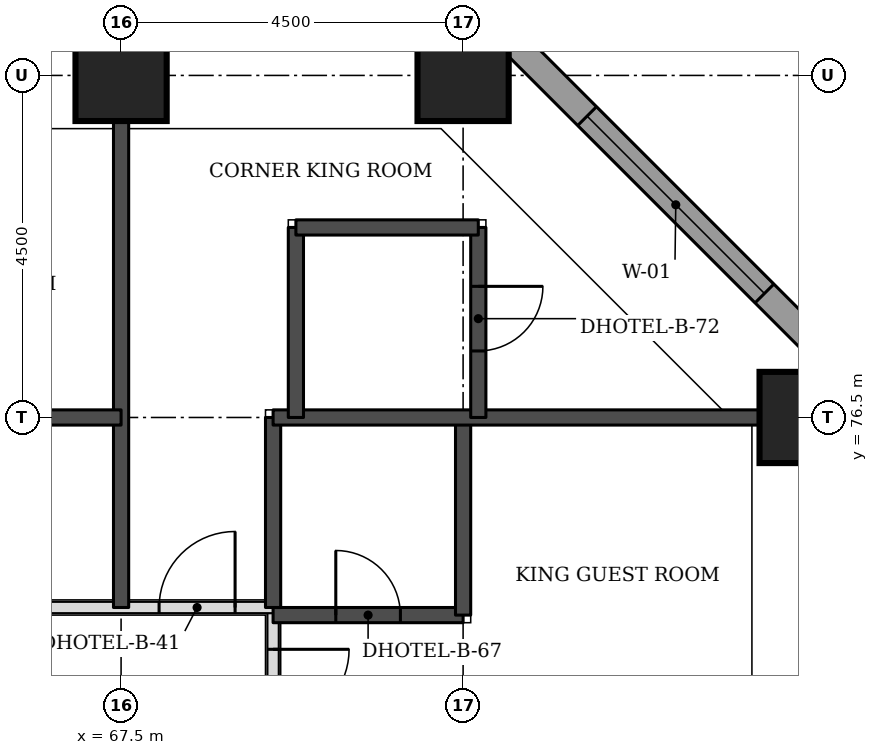
"""IFC4 building model, lengths in metres.
Left out: names, types, materials, properties, quantities, classifications, styles, units other than length and angle.
Written with IfcOpenShell. Run it as: python <this file> out.ifc"""

import sys

from ifc_helpers import new_model, si_unit, direction, frame, frame_2d, origin, origin_2d, place, context, subcontext, project, spatial, rectangle, extrude, element, fill, save


model = new_model("IFC4")
c1 = context("Model", 3, precision=1e-05, world=origin(), true_north=direction((0.0, 1.0)))
c2 = subcontext(c1, "Body", "Model", "MODEL_VIEW")
j1 = project(units=[si_unit("LENGTHUNIT", "METRE"), si_unit("PLANEANGLEUNIT", "RADIAN")], contexts=[c1])
p1 = place(None, origin())
s1 = spatial("IfcSite", under=j1, at=p1, CompositionType="ELEMENT")
p2 = place(p1, origin())
s2 = spatial("IfcBuilding", under=s1, at=p2, CompositionType="ELEMENT")
p3 = place(p2, frame((0.0, 0.0, 52.8)))
s3 = spatial("IfcBuildingStorey", under=s2, at=p3, CompositionType="ELEMENT", Elevation=52.8)
for number, where, z_axis, x_axis in (
    (1, (76.5, 76.5, 0.0), (0.0, 0.0, 1.0), (1.0, 0.0, 0.0)),
    (2, (67.5, 81.0, 0.0), (0.0, 0.0, 1.0), (1.0, 0.0, 0.0)),
    (3, (72.0, 81.0, 0.0), (0.0, 0.0, 1.0), (1.0, 0.0, 0.0)),
):
    element("IfcColumn", number, at=place(p3, frame(where, z_axis=z_axis, x_axis=x_axis)), inside=s3, PredefinedType="COLUMN", context=c2, shape_type="SweptSolid", body=[
        extrude(rectangle(XDim=1.2, YDim=1.2, at=origin_2d()), origin(), (0.0, 0.0, 1.0), 3.3),
    ])
p4 = place(p3, frame((77.326, 76.77, 0.0), z_axis=(0.0, 0.0, 1.0), x_axis=(-0.707106781187, 0.707106781187, 0.0)))
e4 = element("IfcWall", 4, at=p4, inside=s3, PredefinedType="STANDARD", context=c2, shape_type="SweptSolid", body=[
    extrude(rectangle(XDim=7.151, YDim=0.35, at=frame_2d((3.576, 0.0))), origin(), (0.0, 0.0, 1.0), 3.055),
])
p5 = place(p4, frame((1.926, 0.0, 0.8)))
e5 = element("IfcOpeningElement", 5, at=p5, cuts=e4, PredefinedType="OPENING", context=c2, shape_type="SweptSolid", body=[
    extrude(rectangle(XDim=3.3, YDim=1.5, at=frame_2d((1.65, 0.75))), frame((0.0, 0.185, 0.0), z_axis=(0.0, -1.0, 0.0), x_axis=(1.0, 0.0, 0.0)), (0.0, 0.0, 1.0), 0.37),
])
p6 = place(p3, frame((69.5, 47.5, 0.0), z_axis=(0.0, 0.0, 1.0), x_axis=(0.0, 1.0, 0.0)))
e6 = element("IfcWall", 6, at=p6, inside=s3, PredefinedType="PARTITIONING", context=c2, shape_type="SweptSolid", body=[
    extrude(rectangle(XDim=26.5, YDim=0.15, at=frame_2d((13.25, 0.0))), origin(), (0.0, 0.0, 1.0), 3.08),
])
p7 = place(p6, frame((24.95, 0.0, 0.0)))
e7 = element("IfcOpeningElement", 7, at=p7, cuts=e6, PredefinedType="OPENING", context=c2, shape_type="SweptSolid", body=[
    extrude(rectangle(XDim=1.0, YDim=2.1, at=frame_2d((0.5, 1.05))), frame((0.0, 0.085, 0.0), z_axis=(0.0, -1.0, 0.0), x_axis=(1.0, 0.0, 0.0)), (0.0, 0.0, 1.0), 0.17),
])
p8 = place(p6, frame((20.7, 0.0, 0.0)))
e8 = element("IfcOpeningElement", 8, at=p8, cuts=e6, PredefinedType="OPENING", context=c2, shape_type="SweptSolid", body=[
    extrude(rectangle(XDim=1.0, YDim=2.1, at=frame_2d((0.5, 1.05))), frame((0.0, 0.085, 0.0), z_axis=(0.0, -1.0, 0.0), x_axis=(1.0, 0.0, 0.0)), (0.0, 0.0, 1.0), 0.17),
])
p9 = place(p6, frame((18.55, 0.0, 0.0)))
e9 = element("IfcOpeningElement", 9, at=p9, cuts=e6, PredefinedType="OPENING", context=c2, shape_type="SweptSolid", body=[
    extrude(rectangle(XDim=1.0, YDim=2.1, at=frame_2d((0.5, 1.05))), frame((0.0, 0.085, 0.0), z_axis=(0.0, -1.0, 0.0), x_axis=(1.0, 0.0, 0.0)), (0.0, 0.0, 1.0), 0.17),
])
p10 = place(p6, frame((11.7, 0.0, 0.0)))
e10 = element("IfcOpeningElement", 10, at=p10, cuts=e6, PredefinedType="OPENING", context=c2, shape_type="SweptSolid", body=[
    extrude(rectangle(XDim=1.0, YDim=2.1, at=frame_2d((0.5, 1.05))), frame((0.0, 0.085, 0.0), z_axis=(0.0, -1.0, 0.0), x_axis=(1.0, 0.0, 0.0)), (0.0, 0.0, 1.0), 0.17),
])
p11 = place(p6, frame((7.65, 0.0, 0.0)))
e11 = element("IfcOpeningElement", 11, at=p11, cuts=e6, PredefinedType="OPENING", context=c2, shape_type="SweptSolid", body=[
    extrude(rectangle(XDim=1.1, YDim=2.1, at=frame_2d((0.55, 1.05))), frame((0.0, 0.085, 0.0), z_axis=(0.0, -1.0, 0.0), x_axis=(1.0, 0.0, 0.0)), (0.0, 0.0, 1.0), 0.17),
])
p12 = place(p6, frame((0.447, 0.0, 0.0)))
e12 = element("IfcOpeningElement", 12, at=p12, cuts=e6, PredefinedType="OPENING", context=c2, shape_type="SweptSolid", body=[
    extrude(rectangle(XDim=1.0, YDim=2.1, at=frame_2d((0.5, 1.05))), frame((0.0, 0.085, 0.0), z_axis=(0.0, -1.0, 0.0), x_axis=(1.0, 0.0, 0.0)), (0.0, 0.0, 1.0), 0.17),
])
p13 = place(p3, frame((43.0, 74.0, 0.0), z_axis=(0.0, 0.0, 1.0), x_axis=(1.0, 0.0, 0.0)))
e13 = element("IfcWall", 13, at=p13, inside=s3, PredefinedType="PARTITIONING", context=c2, shape_type="SweptSolid", body=[
    extrude(rectangle(XDim=26.5, YDim=0.15, at=frame_2d((13.25, 0.0))), origin(), (0.0, 0.0, 1.0), 3.08),
])
p14 = place(p13, frame((4.65, 0.0, 0.0)))
e14 = element("IfcOpeningElement", 14, at=p14, cuts=e13, PredefinedType="OPENING", context=c2, shape_type="SweptSolid", body=[
    extrude(rectangle(XDim=1.0, YDim=2.1, at=frame_2d((0.5, 1.05))), frame((0.0, 0.085, 0.0), z_axis=(0.0, -1.0, 0.0), x_axis=(1.0, 0.0, 0.0)), (0.0, 0.0, 1.0), 0.17),
])
p15 = place(p13, frame((16.6, 0.0, 0.0)))
e15 = element("IfcOpeningElement", 15, at=p15, cuts=e13, PredefinedType="OPENING", context=c2, shape_type="SweptSolid", body=[
    extrude(rectangle(XDim=1.0, YDim=2.1, at=frame_2d((0.5, 1.05))), frame((0.0, 0.085, 0.0), z_axis=(0.0, -1.0, 0.0), x_axis=(1.0, 0.0, 0.0)), (0.0, 0.0, 1.0), 0.17),
])
p16 = place(p13, frame((20.7, 0.0, 0.0)))
e16 = element("IfcOpeningElement", 16, at=p16, cuts=e13, PredefinedType="OPENING", context=c2, shape_type="SweptSolid", body=[
    extrude(rectangle(XDim=1.0, YDim=2.1, at=frame_2d((0.5, 1.05))), frame((0.0, 0.085, 0.0), z_axis=(0.0, -1.0, 0.0), x_axis=(1.0, 0.0, 0.0)), (0.0, 0.0, 1.0), 0.17),
])
p17 = place(p13, frame((0.5, 0.0, 0.0)))
e17 = element("IfcOpeningElement", 17, at=p17, cuts=e13, PredefinedType="OPENING", context=c2, shape_type="SweptSolid", body=[
    extrude(rectangle(XDim=1.0, YDim=2.1, at=frame_2d((0.5, 1.05))), frame((0.0, 0.085, 0.0), z_axis=(0.0, -1.0, 0.0), x_axis=(1.0, 0.0, 0.0)), (0.0, 0.0, 1.0), 0.17),
])
p18 = place(p13, frame((25.0, 0.0, 0.0)))
e18 = element("IfcOpeningElement", 18, at=p18, cuts=e13, PredefinedType="OPENING", context=c2, shape_type="SweptSolid", body=[
    extrude(rectangle(XDim=1.0, YDim=2.1, at=frame_2d((0.5, 1.05))), frame((0.0, 0.085, 0.0), z_axis=(0.0, -1.0, 0.0), x_axis=(1.0, 0.0, 0.0)), (0.0, 0.0, 1.0), 0.17),
])
p19 = place(p3, frame((69.5, 73.9, 0.0), z_axis=(0.0, 0.0, 1.0), x_axis=(1.0, 0.0, 0.0)))
e19 = element("IfcWall", 19, at=p19, inside=s3, PredefinedType="SOLIDWALL", context=c2, shape_type="SweptSolid", body=[
    extrude(rectangle(XDim=2.5, YDim=0.2, at=frame_2d((1.25, 0.0))), origin(), (0.0, 0.0, 1.0), 3.08),
])
p20 = place(p19, frame((0.825, 0.0, 0.0)))
e20 = element("IfcOpeningElement", 20, at=p20, cuts=e19, PredefinedType="OPENING", context=c2, shape_type="SweptSolid", body=[
    extrude(rectangle(XDim=0.85, YDim=2.1, at=frame_2d((0.425, 1.05))), frame((0.0, 0.11, 0.0), z_axis=(0.0, -1.0, 0.0), x_axis=(1.0, 0.0, 0.0)), (0.0, 0.0, 1.0), 0.22),
])
p21 = place(p3, frame((72.0, 73.9, 0.0), z_axis=(0.0, 0.0, 1.0), x_axis=(0.0, 1.0, 0.0)))
e21 = element("IfcWall", 21, at=p21, inside=s3, PredefinedType="SOLIDWALL", context=c2, shape_type="SweptSolid", body=[
    extrude(rectangle(XDim=2.6, YDim=0.2, at=frame_2d((1.3, 0.0))), origin(), (0.0, 0.0, 1.0), 3.08),
])
p22 = place(p3, frame((67.5, 74.0, 0.0), z_axis=(0.0, 0.0, 1.0), x_axis=(0.0, 1.0, 0.0)))
e22 = element("IfcWall", 22, at=p22, inside=s3, PredefinedType="SOLIDWALL", context=c2, shape_type="SweptSolid", body=[
    extrude(rectangle(XDim=6.4, YDim=0.2, at=frame_2d((3.2, 0.0))), origin(), (0.0, 0.0, 1.0), 3.08),
])
p23 = place(p3, frame((69.5, 74.0, 0.0), z_axis=(0.0, 0.0, 1.0), x_axis=(0.0, 1.0, 0.0)))
e23 = element("IfcWall", 23, at=p23, inside=s3, PredefinedType="SOLIDWALL", context=c2, shape_type="SweptSolid", body=[
    extrude(rectangle(XDim=2.5, YDim=0.2, at=frame_2d((1.25, 0.0))), origin(), (0.0, 0.0, 1.0), 3.08),
])
p24 = place(p3, frame((65.4, 76.5, 0.0), z_axis=(0.0, 0.0, 1.0), x_axis=(1.0, 0.0, 0.0)))
e24 = element("IfcWall", 24, at=p24, inside=s3, PredefinedType="SOLIDWALL", context=c2, shape_type="SweptSolid", body=[
    extrude(rectangle(XDim=2.1, YDim=0.2, at=frame_2d((1.05, 0.0))), origin(), (0.0, 0.0, 1.0), 3.08),
])
p25 = place(p3, frame((69.5, 76.5, 0.0), z_axis=(0.0, 0.0, 1.0), x_axis=(1.0, 0.0, 0.0)))
e25 = element("IfcWall", 25, at=p25, inside=s3, PredefinedType="SOLIDWALL", context=c2, shape_type="SweptSolid", body=[
    extrude(rectangle(XDim=6.4, YDim=0.2, at=frame_2d((3.2, 0.0))), origin(), (0.0, 0.0, 1.0), 3.08),
])
p26 = place(p3, frame((69.8, 76.5, 0.0), z_axis=(0.0, 0.0, 1.0), x_axis=(0.0, 1.0, 0.0)))
e26 = element("IfcWall", 26, at=p26, inside=s3, PredefinedType="SOLIDWALL", context=c2, shape_type="SweptSolid", body=[
    extrude(rectangle(XDim=2.5, YDim=0.2, at=frame_2d((1.25, 0.0))), origin(), (0.0, 0.0, 1.0), 3.08),
])
p27 = place(p3, frame((72.2, 76.5, 0.0), z_axis=(0.0, 0.0, 1.0), x_axis=(0.0, 1.0, 0.0)))
e27 = element("IfcWall", 27, at=p27, inside=s3, PredefinedType="SOLIDWALL", context=c2, shape_type="SweptSolid", body=[
    extrude(rectangle(XDim=2.5, YDim=0.2, at=frame_2d((1.25, 0.0))), origin(), (0.0, 0.0, 1.0), 3.08),
])
p28 = place(p27, frame((0.875, 0.0, 0.0)))
e28 = element("IfcOpeningElement", 28, at=p28, cuts=e27, PredefinedType="OPENING", context=c2, shape_type="SweptSolid", body=[
    extrude(rectangle(XDim=0.85, YDim=2.1, at=frame_2d((0.425, 1.05))), frame((0.0, 0.11, 0.0), z_axis=(0.0, -1.0, 0.0), x_axis=(1.0, 0.0, 0.0)), (0.0, 0.0, 1.0), 0.22),
])
p29 = place(p3, frame((69.8, 79.0, 0.0), z_axis=(0.0, 0.0, 1.0), x_axis=(1.0, 0.0, 0.0)))
e29 = element("IfcWall", 29, at=p29, inside=s3, PredefinedType="SOLIDWALL", context=c2, shape_type="SweptSolid", body=[
    extrude(rectangle(XDim=2.4, YDim=0.2, at=frame_2d((1.2, 0.0))), origin(), (0.0, 0.0, 1.0), 3.08),
])
p30 = place(p5, origin())
e30 = element("IfcWindow", 30, at=p30, inside=s3, PartitioningType="SINGLE_PANEL", PredefinedType="WINDOW", context=c2, shape_type="SweptSolid", body=[
    extrude(rectangle(XDim=3.3, YDim=1.5, at=frame_2d((1.65, 0.75))), frame((0.0, 0.085, 0.0), z_axis=(0.0, -1.0, 0.0), x_axis=(1.0, 0.0, 0.0)), (0.0, 0.0, 1.0), 0.06),
])
fill(e5, e30)
p31 = place(p7, frame((1.0, 0.0, 0.0), z_axis=(0.0, 0.0, 1.0), x_axis=(-1.0, 0.0, 0.0)))
e31 = element("IfcDoor", 31, at=p31, inside=s3, OperationType="SINGLE_SWING_LEFT", PredefinedType="DOOR", context=c2, shape_type="SweptSolid", body=[
    extrude(rectangle(XDim=1.0, YDim=2.1, at=frame_2d((0.5, 1.05))), frame((0.0, 0.025, 0.0), z_axis=(0.0, -1.0, 0.0), x_axis=(1.0, 0.0, 0.0)), (0.0, 0.0, 1.0), 0.05),
])
fill(e7, e31)
p32 = place(p20, origin())
e32 = element("IfcDoor", 32, at=p32, inside=s3, OperationType="SINGLE_SWING_LEFT", PredefinedType="DOOR", context=c2, shape_type="SweptSolid", body=[
    extrude(rectangle(XDim=0.85, YDim=2.1, at=frame_2d((0.425, 1.05))), frame((0.0, 0.025, 0.0), z_axis=(0.0, -1.0, 0.0), x_axis=(1.0, 0.0, 0.0)), (0.0, 0.0, 1.0), 0.05),
])
fill(e20, e32)
p33 = place(p18, origin())
e33 = element("IfcDoor", 33, at=p33, inside=s3, OperationType="SINGLE_SWING_RIGHT", PredefinedType="DOOR", context=c2, shape_type="SweptSolid", body=[
    extrude(rectangle(XDim=1.0, YDim=2.1, at=frame_2d((0.5, 1.05))), frame((0.0, 0.025, 0.0), z_axis=(0.0, -1.0, 0.0), x_axis=(1.0, 0.0, 0.0)), (0.0, 0.0, 1.0), 0.05),
])
fill(e18, e33)
p34 = place(p28, frame((0.85, 0.0, 0.0), z_axis=(0.0, 0.0, 1.0), x_axis=(-1.0, 0.0, 0.0)))
e34 = element("IfcDoor", 34, at=p34, inside=s3, OperationType="SINGLE_SWING_LEFT", PredefinedType="DOOR", context=c2, shape_type="SweptSolid", body=[
    extrude(rectangle(XDim=0.85, YDim=2.1, at=frame_2d((0.425, 1.05))), frame((0.0, 0.025, 0.0), z_axis=(0.0, -1.0, 0.0), x_axis=(1.0, 0.0, 0.0)), (0.0, 0.0, 1.0), 0.05),
])
fill(e28, e34)
save(model, sys.argv[1])
